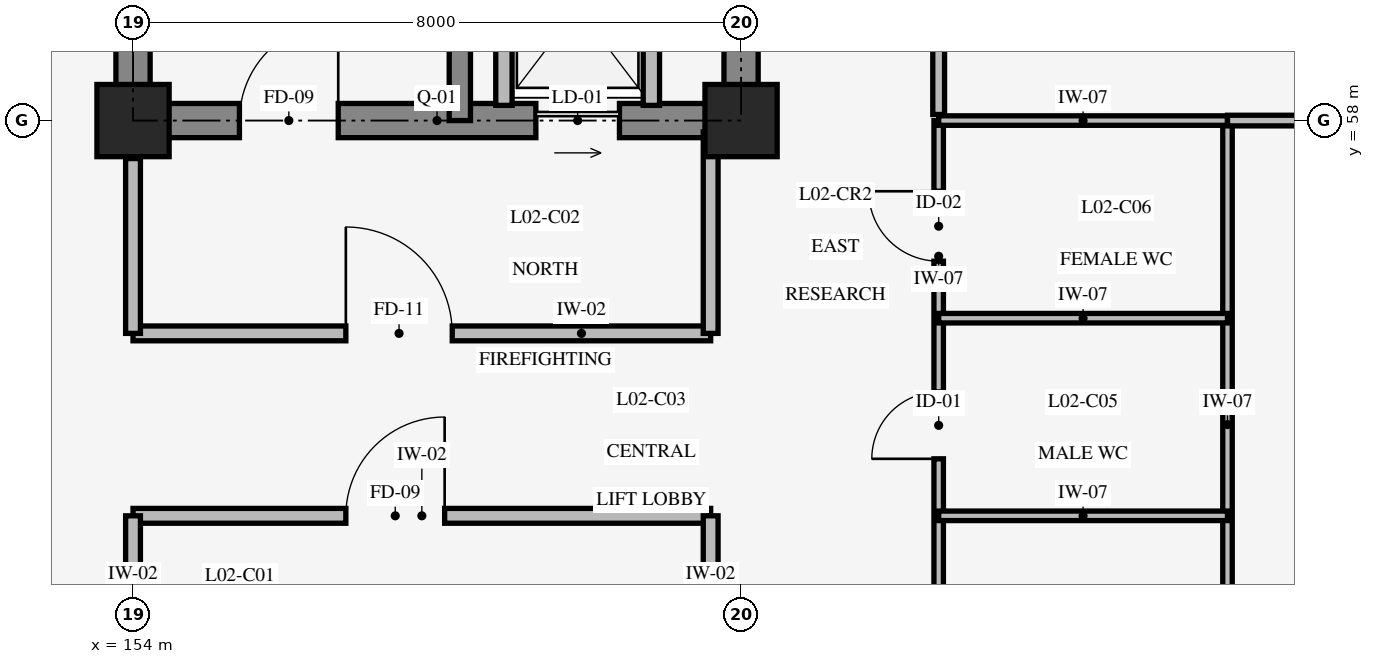
"""IFC4 building model, lengths in metres.
Left out: names, types, materials, properties, quantities, classifications, styles, units other than length and angle.
Written with IfcOpenShell. Run it as: python <this file> out.ifc"""

import sys

from ifc_helpers import new_model, si_unit, direction, frame, frame_2d, origin, origin_2d, place, context, subcontext, project, spatial, rectangle, extrude, element, fill, save


model = new_model("IFC4")
c1 = context("Model", 3, precision=1e-05, world=origin(), true_north=direction((0.0, 1.0)))
c2 = subcontext(c1, "Body", "Model", "MODEL_VIEW")
j1 = project(units=[si_unit("LENGTHUNIT", "METRE"), si_unit("PLANEANGLEUNIT", "RADIAN")], contexts=[c1])
p1 = place(None, origin())
s1 = spatial("IfcSite", under=j1, at=p1, CompositionType="ELEMENT")
p2 = place(p1, origin())
s2 = spatial("IfcBuilding", under=s1, at=p2, CompositionType="ELEMENT")
p3 = place(p2, frame((0.0, 0.0, 5.4)))
s3 = spatial("IfcBuildingStorey", under=s2, at=p3, CompositionType="ELEMENT", Elevation=5.4)
p4 = place(p3, frame((154.0, 58.0, 0.0), z_axis=(0.0, 0.0, 1.0), x_axis=(1.0, 0.0, 0.0)))
e1 = element("IfcWall", 1, at=p4, inside=s3, PredefinedType="SHEAR", context=c2, shape_type="SweptSolid", body=[
    extrude(rectangle(XDim=8.0, YDim=0.45, at=frame_2d((4.0, 0.0))), origin(), (0.0, 0.0, 1.0), 4.55),
])
p5 = place(p4, frame((1.4, 0.0, 0.0)))
e2 = element("IfcOpeningElement", 2, at=p5, cuts=e1, PredefinedType="OPENING", context=c2, shape_type="SweptSolid", body=[
    extrude(rectangle(XDim=1.3, YDim=2.15, at=frame_2d((0.65, 1.075))), frame((0.0, 0.235, 0.0), z_axis=(0.0, -1.0, 0.0), x_axis=(1.0, 0.0, 0.0)), (0.0, 0.0, 1.0), 0.47),
])
p6 = place(p4, frame((5.3, 0.0, 0.0)))
e3 = element("IfcOpeningElement", 3, at=p6, cuts=e1, PredefinedType="OPENING", context=c2, shape_type="SweptSolid", body=[
    extrude(rectangle(XDim=1.1, YDim=2.2, at=frame_2d((0.55, 1.1))), frame((0.0, 0.235, 0.0), z_axis=(0.0, -1.0, 0.0), x_axis=(1.0, 0.0, 0.0)), (0.0, 0.0, 1.0), 0.47),
])
p7 = place(p3, frame((162.0, 58.0, 0.0), z_axis=(0.0, 0.0, 1.0), x_axis=(0.0, 1.0, 0.0)))
e4 = element("IfcWall", 4, at=p7, inside=s3, PredefinedType="SHEAR", context=c2, shape_type="SweptSolid", body=[
    extrude(rectangle(XDim=8.0, YDim=0.45, at=frame_2d((4.0, 0.0))), origin(), (0.0, 0.0, 1.0), 4.55),
])
p8 = place(p7, frame((3.275, 0.0, 0.0)))
e5 = element("IfcOpeningElement", 5, at=p8, cuts=e4, PredefinedType="OPENING", context=c2, shape_type="SweptSolid", body=[
    extrude(rectangle(XDim=1.05, YDim=2.2, at=frame_2d((0.525, 1.1))), frame((0.0, 0.235, 0.0), z_axis=(0.0, -1.0, 0.0), x_axis=(1.0, 0.0, 0.0)), (0.0, 0.0, 1.0), 0.47),
])
p9 = place(p7, frame((5.45, 0.0, 0.0)))
e6 = element("IfcOpeningElement", 6, at=p9, cuts=e4, PredefinedType="OPENING", context=c2, shape_type="SweptSolid", body=[
    extrude(rectangle(XDim=1.4, YDim=2.3, at=frame_2d((0.7, 1.15))), frame((0.0, 0.235, 0.0), z_axis=(0.0, -1.0, 0.0), x_axis=(1.0, 0.0, 0.0)), (0.0, 0.0, 1.0), 0.47),
])
p10 = place(p3, frame((154.0, 66.0, 0.0), z_axis=(0.0, 0.0, 1.0), x_axis=(0.0, -1.0, 0.0)))
e7 = element("IfcWall", 7, at=p10, inside=s3, PredefinedType="SHEAR", context=c2, shape_type="SweptSolid", body=[
    extrude(rectangle(XDim=8.0, YDim=0.45, at=frame_2d((4.0, 0.0))), origin(), (0.0, 0.0, 1.0), 4.55),
])
p11 = place(p3, frame((158.3, 58.0, 0.0), z_axis=(0.0, 0.0, 1.0), x_axis=(0.0, 1.0, 0.0)))
e8 = element("IfcWall", 8, at=p11, inside=s3, PredefinedType="SHEAR", context=c2, shape_type="SweptSolid", body=[
    extrude(rectangle(XDim=8.0, YDim=0.28, at=frame_2d((4.0, 0.0))), origin(), (0.0, 0.0, 1.0), 4.55),
])
for number, where, z_axis, x_axis in (
    (9, (154.0, 58.0, 0.0), (0.0, 0.0, 1.0), (1.0, 0.0, 0.0)),
    (10, (162.0, 58.0, 0.0), (0.0, 0.0, 1.0), (1.0, 0.0, 0.0)),
):
    element("IfcColumn", number, at=place(p3, frame(where, z_axis=z_axis, x_axis=x_axis)), inside=s3, PredefinedType="COLUMN", context=c2, shape_type="SweptSolid", body=[
        extrude(rectangle(XDim=0.95, YDim=0.95, at=origin_2d()), origin(), (0.0, 0.0, 1.0), 4.8),
    ])
for number, where, z_axis, x_axis in (
    (11, (160.82, 58.2, 0.0), (0.0, 0.0, 1.0), (0.0, 1.0, 0.0)),
    (12, (158.88, 58.2, 0.0), (0.0, 0.0, 1.0), (0.0, 1.0, 0.0)),
):
    element("IfcWall", number, at=place(p3, frame(where, z_axis=z_axis, x_axis=x_axis)), inside=s3, PredefinedType="STANDARD", context=c2, shape_type="SweptSolid", body=[
        extrude(rectangle(XDim=2.55, YDim=0.215, at=frame_2d((1.275, 0.0))), origin(), (0.0, 0.0, 1.0), 4.5),
    ])
p12 = place(p3, frame((154.0, 52.8, 0.0), z_axis=(0.0, 0.0, 1.0), x_axis=(1.0, 0.0, 0.0)))
e13 = element("IfcWall", 13, at=p12, inside=s3, PredefinedType="STANDARD", context=c2, shape_type="SweptSolid", body=[
    extrude(rectangle(XDim=7.6, YDim=0.195, at=frame_2d((3.8, 0.0))), origin(), (0.0, 0.0, 1.0), 4.5),
])
p13 = place(p12, frame((2.8, 0.0, 0.0)))
e14 = element("IfcOpeningElement", 14, at=p13, cuts=e13, PredefinedType="OPENING", context=c2, shape_type="SweptSolid", body=[
    extrude(rectangle(XDim=1.3, YDim=2.15, at=frame_2d((0.65, 1.075))), frame((0.0, 0.107, 0.0), z_axis=(0.0, -1.0, 0.0), x_axis=(1.0, 0.0, 0.0)), (0.0, 0.0, 1.0), 0.215),
])
p14 = place(p3, frame((161.6, 50.15, 0.0), z_axis=(0.0, 0.0, 1.0), x_axis=(0.0, 1.0, 0.0)))
e15 = element("IfcWall", 15, at=p14, inside=s3, PredefinedType="STANDARD", context=c2, shape_type="SweptSolid", body=[
    extrude(rectangle(XDim=2.65, YDim=0.195, at=frame_2d((1.325, 0.0))), origin(), (0.0, 0.0, 1.0), 3.55),
])
p15 = place(p3, frame((154.0, 50.5, 0.0), z_axis=(0.0, 0.0, 1.0), x_axis=(0.0, 1.0, 0.0)))
e16 = element("IfcWall", 16, at=p15, inside=s3, PredefinedType="STANDARD", context=c2, shape_type="SweptSolid", body=[
    extrude(rectangle(XDim=2.3, YDim=0.195, at=frame_2d((1.15, 0.0))), origin(), (0.0, 0.0, 1.0), 3.55),
])
p16 = place(p3, frame((154.0, 55.2, 0.0), z_axis=(0.0, 0.0, 1.0), x_axis=(1.0, 0.0, 0.0)))
e17 = element("IfcWall", 17, at=p16, inside=s3, PredefinedType="STANDARD", context=c2, shape_type="SweptSolid", body=[
    extrude(rectangle(XDim=7.6, YDim=0.195, at=frame_2d((3.8, 0.0))), origin(), (0.0, 0.0, 1.0), 4.5),
])
p17 = place(p16, frame((2.8, 0.0, 0.0)))
e18 = element("IfcOpeningElement", 18, at=p17, cuts=e17, PredefinedType="OPENING", context=c2, shape_type="SweptSolid", body=[
    extrude(rectangle(XDim=1.4, YDim=2.2, at=frame_2d((0.7, 1.1))), frame((0.0, 0.107, 0.0), z_axis=(0.0, -1.0, 0.0), x_axis=(1.0, 0.0, 0.0)), (0.0, 0.0, 1.0), 0.215),
])
p18 = place(p3, frame((161.6, 55.2, 0.0), z_axis=(0.0, 0.0, 1.0), x_axis=(0.0, 1.0, 0.0)))
e19 = element("IfcWall", 19, at=p18, inside=s3, PredefinedType="STANDARD", context=c2, shape_type="SweptSolid", body=[
    extrude(rectangle(XDim=2.65, YDim=0.195, at=frame_2d((1.325, 0.0))), origin(), (0.0, 0.0, 1.0), 3.55),
])
p19 = place(p3, frame((154.0, 55.2, 0.0), z_axis=(0.0, 0.0, 1.0), x_axis=(0.0, 1.0, 0.0)))
e20 = element("IfcWall", 20, at=p19, inside=s3, PredefinedType="STANDARD", context=c2, shape_type="SweptSolid", body=[
    extrude(rectangle(XDim=2.3, YDim=0.195, at=frame_2d((1.15, 0.0))), origin(), (0.0, 0.0, 1.0), 3.55),
])
p20 = place(p3, frame((164.6, 50.0, 0.0), z_axis=(0.0, 0.0, 1.0), x_axis=(0.0, 1.0, 0.0)))
e21 = element("IfcWall", 21, at=p20, inside=s3, PredefinedType="STANDARD", context=c2, shape_type="SweptSolid", body=[
    extrude(rectangle(XDim=8.0, YDim=0.125, at=frame_2d((4.0, 0.0))), origin(), (0.0, 0.0, 1.0), 4.5),
])
p21 = place(p20, frame((0.9, 0.0, 0.0)))
e22 = element("IfcOpeningElement", 22, at=p21, cuts=e21, PredefinedType="OPENING", context=c2, shape_type="SweptSolid", body=[
    extrude(rectangle(XDim=0.96, YDim=2.08, at=frame_2d((0.48, 1.04))), frame((0.0, 0.073, 0.0), z_axis=(0.0, -1.0, 0.0), x_axis=(1.0, 0.0, 0.0)), (0.0, 0.0, 1.0), 0.145),
])
p22 = place(p20, frame((3.55, 0.0, 0.0)))
e23 = element("IfcOpeningElement", 23, at=p22, cuts=e21, PredefinedType="OPENING", context=c2, shape_type="SweptSolid", body=[
    extrude(rectangle(XDim=0.88, YDim=2.05, at=frame_2d((0.44, 1.025))), frame((0.0, 0.073, 0.0), z_axis=(0.0, -1.0, 0.0), x_axis=(1.0, 0.0, 0.0)), (0.0, 0.0, 1.0), 0.145),
])
p23 = place(p20, frame((6.15, 0.0, 0.0)))
e24 = element("IfcOpeningElement", 24, at=p23, cuts=e21, PredefinedType="OPENING", context=c2, shape_type="SweptSolid", body=[
    extrude(rectangle(XDim=0.92, YDim=2.05, at=frame_2d((0.46, 1.025))), frame((0.0, 0.073, 0.0), z_axis=(0.0, -1.0, 0.0), x_axis=(1.0, 0.0, 0.0)), (0.0, 0.0, 1.0), 0.145),
])
p24 = place(p3, frame((168.4, 50.0, 0.0), z_axis=(0.0, 0.0, 1.0), x_axis=(0.0, 1.0, 0.0)))
e25 = element("IfcWall", 25, at=p24, inside=s3, PredefinedType="STANDARD", context=c2, shape_type="SweptSolid", body=[
    extrude(rectangle(XDim=8.0, YDim=0.125, at=frame_2d((4.0, 0.0))), origin(), (0.0, 0.0, 1.0), 4.5),
])
for number, where, z_axis, x_axis in (
    (26, (164.6, 52.8, 0.0), (0.0, 0.0, 1.0), (1.0, 0.0, 0.0)),
    (27, (164.6, 55.4, 0.0), (0.0, 0.0, 1.0), (1.0, 0.0, 0.0)),
):
    element("IfcWall", number, at=place(p3, frame(where, z_axis=z_axis, x_axis=x_axis)), inside=s3, PredefinedType="STANDARD", context=c2, shape_type="SweptSolid", body=[
        extrude(rectangle(XDim=3.8, YDim=0.125, at=frame_2d((1.9, 0.0))), origin(), (0.0, 0.0, 1.0), 4.5),
    ])
p25 = place(p3, frame((164.6, 58.0, 0.0), z_axis=(0.0, 0.0, 1.0), x_axis=(1.0, 0.0, 0.0)))
e28 = element("IfcWall", 28, at=p25, inside=s3, PredefinedType="STANDARD", context=c2, shape_type="SweptSolid", body=[
    extrude(rectangle(XDim=3.8, YDim=0.125, at=frame_2d((1.9, 0.0))), origin(), (0.0, 0.0, 1.0), 3.6),
])
p26 = place(p3, frame((168.4, 58.0, 0.0), z_axis=(0.0, 0.0, 1.0), x_axis=(1.0, 0.0, 0.0)))
e29 = element("IfcWall", 29, at=p26, inside=s3, PredefinedType="STANDARD", context=c2, shape_type="SweptSolid", body=[
    extrude(rectangle(XDim=8.96, YDim=0.14, at=frame_2d((4.48, 0.0))), origin(), (0.0, 0.0, 1.0), 3.6),
])
p27 = place(p26, frame((3.92, 0.0, 0.0)))
e30 = element("IfcOpeningElement", 30, at=p27, cuts=e29, PredefinedType="OPENING", context=c2, shape_type="SweptSolid", body=[
    extrude(rectangle(XDim=1.12, YDim=2.12, at=frame_2d((0.56, 1.06))), frame((0.0, 0.08, 0.0), z_axis=(0.0, -1.0, 0.0), x_axis=(1.0, 0.0, 0.0)), (0.0, 0.0, 1.0), 0.16),
])
p28 = place(p3, frame((164.6, 58.08, 0.0), z_axis=(0.0, 0.0, 1.0), x_axis=(0.0, 1.0, 0.0)))
e31 = element("IfcWall", 31, at=p28, inside=s3, PredefinedType="STANDARD", context=c2, shape_type="SweptSolid", body=[
    extrude(rectangle(XDim=15.8, YDim=0.155, at=frame_2d((7.9, 0.0))), origin(), (0.0, 0.0, 1.0), 4.5),
])
p29 = place(p28, frame((7.3, 0.0, 0.0)))
e32 = element("IfcOpeningElement", 32, at=p29, cuts=e31, PredefinedType="OPENING", context=c2, shape_type="SweptSolid", body=[
    extrude(rectangle(XDim=1.2, YDim=2.1, at=frame_2d((0.6, 1.05))), frame((0.0, 0.087, 0.0), z_axis=(0.0, -1.0, 0.0), x_axis=(1.0, 0.0, 0.0)), (0.0, 0.0, 1.0), 0.175),
])
p30 = place(p5, origin())
e33 = element("IfcDoor", 33, at=p30, inside=s3, OperationType="SINGLE_SWING_RIGHT", PredefinedType="DOOR", context=c2, shape_type="SweptSolid", body=[
    extrude(rectangle(XDim=1.3, YDim=2.15, at=frame_2d((0.65, 1.075))), frame((0.0, 0.025, 0.0), z_axis=(0.0, -1.0, 0.0), x_axis=(1.0, 0.0, 0.0)), (0.0, 0.0, 1.0), 0.05),
])
fill(e2, e33)
p31 = place(p6, origin())
e34 = element("IfcDoor", 34, at=p31, inside=s3, OperationType="SLIDING_TO_RIGHT", PredefinedType="DOOR", context=c2, shape_type="SweptSolid", body=[
    extrude(rectangle(XDim=1.1, YDim=2.2, at=frame_2d((0.55, 1.1))), frame((0.0, 0.025, 0.0), z_axis=(0.0, -1.0, 0.0), x_axis=(1.0, 0.0, 0.0)), (0.0, 0.0, 1.0), 0.05),
])
fill(e3, e34)
p32 = place(p13, origin())
e35 = element("IfcDoor", 35, at=p32, inside=s3, OperationType="SINGLE_SWING_RIGHT", PredefinedType="DOOR", context=c2, shape_type="SweptSolid", body=[
    extrude(rectangle(XDim=1.3, YDim=2.15, at=frame_2d((0.65, 1.075))), frame((0.0, 0.025, 0.0), z_axis=(0.0, -1.0, 0.0), x_axis=(1.0, 0.0, 0.0)), (0.0, 0.0, 1.0), 0.05),
])
fill(e14, e35)
p33 = place(p17, origin())
e36 = element("IfcDoor", 36, at=p33, inside=s3, OperationType="SINGLE_SWING_LEFT", PredefinedType="DOOR", context=c2, shape_type="SweptSolid", body=[
    extrude(rectangle(XDim=1.4, YDim=2.2, at=frame_2d((0.7, 1.1))), frame((0.0, 0.025, 0.0), z_axis=(0.0, -1.0, 0.0), x_axis=(1.0, 0.0, 0.0)), (0.0, 0.0, 1.0), 0.05),
])
fill(e18, e36)
p34 = place(p22, origin())
e37 = element("IfcDoor", 37, at=p34, inside=s3, OperationType="SINGLE_SWING_LEFT", PredefinedType="DOOR", context=c2, shape_type="SweptSolid", body=[
    extrude(rectangle(XDim=0.88, YDim=2.05, at=frame_2d((0.44, 1.025))), frame((0.0, 0.025, 0.0), z_axis=(0.0, -1.0, 0.0), x_axis=(1.0, 0.0, 0.0)), (0.0, 0.0, 1.0), 0.05),
])
fill(e23, e37)
p35 = place(p23, origin())
e38 = element("IfcDoor", 38, at=p35, inside=s3, OperationType="SINGLE_SWING_RIGHT", PredefinedType="DOOR", context=c2, shape_type="SweptSolid", body=[
    extrude(rectangle(XDim=0.92, YDim=2.05, at=frame_2d((0.46, 1.025))), frame((0.0, 0.025, 0.0), z_axis=(0.0, -1.0, 0.0), x_axis=(1.0, 0.0, 0.0)), (0.0, 0.0, 1.0), 0.05),
])
fill(e24, e38)
save(model, sys.argv[1])
